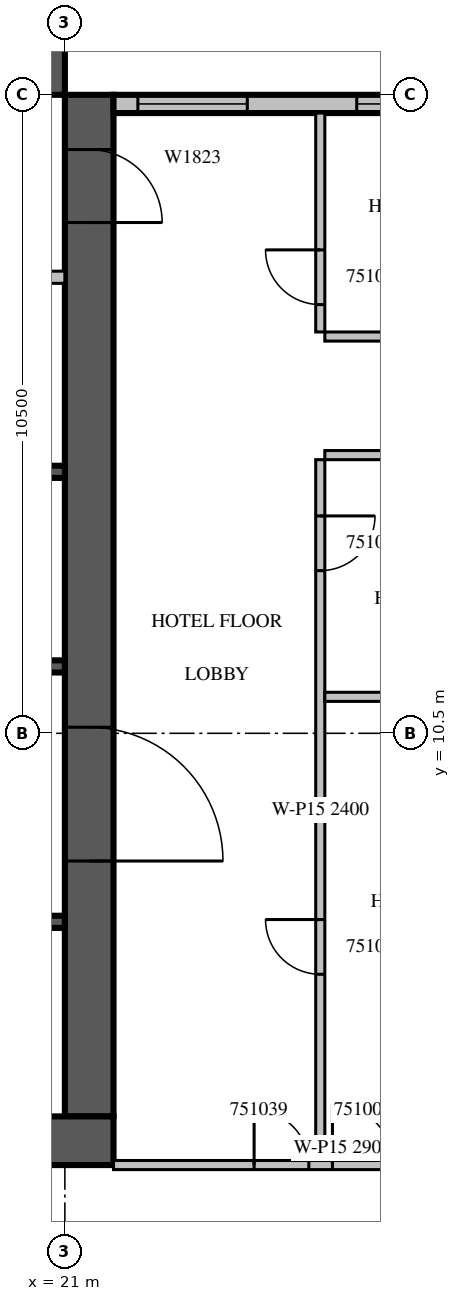
"""IFC4 building model, lengths in metres.
Left out: names, types, materials, properties, quantities, classifications, styles, units other than length and angle.
Written with IfcOpenShell. Run it as: python <this file> out.ifc"""

import sys

from ifc_helpers import new_model, si_unit, direction, frame, frame_2d, origin, place, context, subcontext, project, spatial, rectangle, extrude, source, transform, mapped, element, fill, save


model = new_model("IFC4")
c1 = context("Model", 3, precision=1e-05, world=origin(), true_north=direction((0.0, 1.0)))
c2 = subcontext(c1, "Body", "Model", "MODEL_VIEW")
j1 = project(units=[si_unit("LENGTHUNIT", "METRE"), si_unit("PLANEANGLEUNIT", "RADIAN")], contexts=[c1])
p1 = place(None, origin())
s1 = spatial("IfcSite", under=j1, at=p1, CompositionType="ELEMENT")
p2 = place(p1, origin())
s2 = spatial("IfcBuilding", under=s1, at=p2, CompositionType="ELEMENT")
p3 = place(p2, frame((0.0, 0.0, 227.2)))
s3 = spatial("IfcBuildingStorey", under=s2, at=p3, CompositionType="ELEMENT", Elevation=227.2)
m1 = source(origin(), c2, "Body", "SweptSolid", [
    extrude(rectangle(XDim=16.8, YDim=0.8, at=frame_2d((8.4, 0.0))), origin(), (0.0, 0.0, 1.0), 3.8),
])
p4 = place(p3, frame((21.4, 4.2, 0.0), z_axis=(0.0, 0.0, 1.0), x_axis=(0.0, 1.0, 0.0)))
e1 = element("IfcWall", 1, at=p4, inside=s3, PredefinedType="SHEAR", context=c2, shape_type="MappedRepresentation", body=[
    mapped(m1, transform((0.0, 0.0, 0.0), scale=1.0)),
])
m2 = source(origin(), c2, "Body", "SweptSolid", [
    extrude(rectangle(XDim=2.2, YDim=2.1, at=frame_2d((1.1, 1.05))), frame((0.0, 0.41, 0.0), z_axis=(0.0, -1.0, 0.0), x_axis=(1.0, 0.0, 0.0)), (0.0, 0.0, 1.0), 0.82),
])
p5 = place(p4, frame((4.2, 0.0, 0.0)))
e2 = element("IfcOpeningElement", 2, at=p5, cuts=e1, PredefinedType="OPENING", context=c2, shape_type="MappedRepresentation", body=[
    mapped(m2, transform((0.0, 0.0, 0.0), scale=1.0)),
])
m3 = source(origin(), c2, "Body", "SweptSolid", [
    extrude(rectangle(XDim=1.2, YDim=2.1, at=frame_2d((0.6, 1.05))), frame((0.0, 0.41, 0.0), z_axis=(0.0, -1.0, 0.0), x_axis=(1.0, 0.0, 0.0)), (0.0, 0.0, 1.0), 0.82),
])
p6 = place(p4, frame((14.7, 0.0, 0.0)))
e3 = element("IfcOpeningElement", 3, at=p6, cuts=e1, PredefinedType="OPENING", context=c2, shape_type="MappedRepresentation", body=[
    mapped(m3, transform((0.0, 0.0, 0.0), scale=1.0)),
])
m4 = source(origin(), c2, "Body", "SweptSolid", [
    extrude(rectangle(XDim=17.6, YDim=0.8, at=frame_2d((8.8, 0.0))), origin(), (0.0, 0.0, 1.0), 3.8),
])
p7 = place(p3, frame((4.2, 3.8, 0.0), z_axis=(0.0, 0.0, 1.0), x_axis=(1.0, 0.0, 0.0)))
e4 = element("IfcWall", 4, at=p7, inside=s3, PredefinedType="SHEAR", context=c2, shape_type="MappedRepresentation", body=[
    mapped(m4, transform((0.0, 0.0, 0.0), scale=1.0)),
])
m5 = source(origin(), c2, "Body", "SweptSolid", [
    extrude(rectangle(XDim=0.9, YDim=2.1, at=frame_2d((0.45, 1.05))), frame((0.0, 0.41, 0.0), z_axis=(0.0, -1.0, 0.0), x_axis=(1.0, 0.0, 0.0)), (0.0, 0.0, 1.0), 0.82),
])
p8 = place(p7, frame((11.55, 0.0, 0.0)))
e5 = element("IfcOpeningElement", 5, at=p8, cuts=e4, PredefinedType="OPENING", context=c2, shape_type="MappedRepresentation", body=[
    mapped(m5, transform((0.0, 0.0, 0.0), scale=1.0)),
])
p9 = place(p3, frame((4.2, 21.4, 0.0), z_axis=(0.0, 0.0, 1.0), x_axis=(1.0, 0.0, 0.0)))
e6 = element("IfcWall", 6, at=p9, inside=s3, PredefinedType="SHEAR", context=c2, shape_type="MappedRepresentation", body=[
    mapped(m1, transform((0.0, 0.0, 0.0), scale=1.0)),
])
p10 = place(p9, frame((6.2, 0.0, 0.0)))
e7 = element("IfcOpeningElement", 7, at=p10, cuts=e6, PredefinedType="OPENING", context=c2, shape_type="MappedRepresentation", body=[
    mapped(m3, transform((0.0, 0.0, 0.0), scale=1.0)),
])
p11 = place(p3, frame((29.0, 20.85, 0.0), z_axis=(0.0, 0.0, 1.0), x_axis=(-1.0, 0.0, 0.0)))
e8 = element("IfcWall", 8, at=p11, inside=s3, PredefinedType="STANDARD", context=c2, shape_type="SweptSolid", body=[
    extrude(rectangle(XDim=7.2, YDim=0.3, at=frame_2d((3.6, 0.0))), origin(), (0.0, 0.0, 1.0), 3.4),
])
m6 = source(origin(), c2, "Body", "SweptSolid", [
    extrude(rectangle(XDim=3.0, YDim=2.3, at=frame_2d((1.5, 1.15))), frame((0.0, 0.16, 0.0), z_axis=(0.0, -1.0, 0.0), x_axis=(1.0, 0.0, 0.0)), (0.0, 0.0, 1.0), 0.32),
])
p12 = place(p11, frame((0.2, 0.0, 0.6)))
e9 = element("IfcOpeningElement", 9, at=p12, cuts=e8, PredefinedType="OPENING", context=c2, shape_type="MappedRepresentation", body=[
    mapped(m6, transform((0.0, 0.0, 0.0), scale=1.0)),
])
m7 = source(origin(), c2, "Body", "SweptSolid", [
    extrude(rectangle(XDim=1.8, YDim=2.3, at=frame_2d((0.9, 1.15))), frame((0.0, 0.16, 0.0), z_axis=(0.0, -1.0, 0.0), x_axis=(1.0, 0.0, 0.0)), (0.0, 0.0, 1.0), 0.32),
])
p13 = place(p11, frame((5.0, 0.0, 0.6)))
e10 = element("IfcOpeningElement", 10, at=p13, cuts=e8, PredefinedType="OPENING", context=c2, shape_type="MappedRepresentation", body=[
    mapped(m7, transform((0.0, 0.0, 0.0), scale=1.0)),
])
m8 = source(origin(), c2, "Body", "SweptSolid", [
    extrude(rectangle(XDim=2.4, YDim=0.2, at=frame_2d((1.2, 0.0))), origin(), (0.0, 0.0, 1.0), 3.8),
])
p14 = place(p3, frame((18.6, 7.4, 0.0), z_axis=(0.0, 0.0, 1.0), x_axis=(1.0, 0.0, 0.0)))
e11 = element("IfcWall", 11, at=p14, inside=s3, PredefinedType="SOLIDWALL", context=c2, shape_type="MappedRepresentation", body=[
    mapped(m8, transform((0.0, 0.0, 0.0), scale=1.0)),
])
m9 = source(origin(), c2, "Body", "SweptSolid", [
    extrude(rectangle(XDim=9.6, YDim=0.2, at=frame_2d((4.8, 0.0))), origin(), (0.0, 0.0, 1.0), 3.8),
])
p15 = place(p3, frame((11.4, 11.6, 0.0), z_axis=(0.0, 0.0, 1.0), x_axis=(1.0, 0.0, 0.0)))
e12 = element("IfcWall", 12, at=p15, inside=s3, PredefinedType="SOLIDWALL", context=c2, shape_type="MappedRepresentation", body=[
    mapped(m9, transform((0.0, 0.0, 0.0), scale=1.0)),
])
p16 = place(p3, frame((11.4, 14.8, 0.0), z_axis=(0.0, 0.0, 1.0), x_axis=(1.0, 0.0, 0.0)))
e13 = element("IfcWall", 13, at=p16, inside=s3, PredefinedType="SOLIDWALL", context=c2, shape_type="MappedRepresentation", body=[
    mapped(m9, transform((0.0, 0.0, 0.0), scale=1.0)),
])
m10 = source(origin(), c2, "Body", "SweptSolid", [
    extrude(rectangle(XDim=1.1, YDim=2.1, at=frame_2d((0.55, 1.05))), frame((0.0, 0.11, 0.0), z_axis=(0.0, -1.0, 0.0), x_axis=(1.0, 0.0, 0.0)), (0.0, 0.0, 1.0), 0.22),
])
p17 = place(p16, frame((3.05, 0.0, 0.0)))
e14 = element("IfcOpeningElement", 14, at=p17, cuts=e13, PredefinedType="OPENING", context=c2, shape_type="MappedRepresentation", body=[
    mapped(m10, transform((0.0, 0.0, 0.0), scale=1.0)),
])
p18 = place(p16, frame((5.45, 0.0, 0.0)))
e15 = element("IfcOpeningElement", 15, at=p18, cuts=e13, PredefinedType="OPENING", context=c2, shape_type="MappedRepresentation", body=[
    mapped(m10, transform((0.0, 0.0, 0.0), scale=1.0)),
])
p19 = place(p16, frame((7.85, 0.0, 0.0)))
e16 = element("IfcOpeningElement", 16, at=p19, cuts=e13, PredefinedType="OPENING", context=c2, shape_type="MappedRepresentation", body=[
    mapped(m10, transform((0.0, 0.0, 0.0), scale=1.0)),
])
m11 = source(origin(), c2, "Body", "SweptSolid", [
    extrude(rectangle(XDim=11.45, YDim=0.2, at=frame_2d((5.725, 0.0))), origin(), (0.0, 0.0, 1.0), 3.4),
])
p20 = place(p3, frame((9.55, 18.0, 0.0), z_axis=(0.0, 0.0, 1.0), x_axis=(1.0, 0.0, 0.0)))
e17 = element("IfcWall", 17, at=p20, inside=s3, PredefinedType="PARTITIONING", context=c2, shape_type="MappedRepresentation", body=[
    mapped(m11, transform((0.0, 0.0, 0.0), scale=1.0)),
])
m12 = source(origin(), c2, "Body", "SweptSolid", [
    extrude(rectangle(XDim=0.9, YDim=2.1, at=frame_2d((0.45, 1.05))), frame((0.0, 0.11, 0.0), z_axis=(0.0, -1.0, 0.0), x_axis=(1.0, 0.0, 0.0)), (0.0, 0.0, 1.0), 0.22),
])
p21 = place(p20, frame((1.075, 0.0, 0.0)))
e18 = element("IfcOpeningElement", 18, at=p21, cuts=e17, PredefinedType="OPENING", context=c2, shape_type="MappedRepresentation", body=[
    mapped(m12, transform((0.0, 0.0, 0.0), scale=1.0)),
])
p22 = place(p20, frame((3.125, 0.0, 0.0)))
e19 = element("IfcOpeningElement", 19, at=p22, cuts=e17, PredefinedType="OPENING", context=c2, shape_type="MappedRepresentation", body=[
    mapped(m12, transform((0.0, 0.0, 0.0), scale=1.0)),
])
p23 = place(p20, frame((7.35, 0.0, 0.0)))
e20 = element("IfcOpeningElement", 20, at=p23, cuts=e17, PredefinedType="OPENING", context=c2, shape_type="MappedRepresentation", body=[
    mapped(m10, transform((0.0, 0.0, 0.0), scale=1.0)),
])
m13 = source(origin(), c2, "Body", "SweptSolid", [
    extrude(rectangle(XDim=11.525, YDim=0.15, at=frame_2d((5.763, 0.0))), origin(), (0.0, 0.0, 1.0), 2.4),
])
p24 = place(p3, frame((25.2, 15.0, 0.0), z_axis=(0.0, 0.0, 1.0), x_axis=(0.0, -1.0, 0.0)))
e21 = element("IfcWall", 21, at=p24, inside=s3, PredefinedType="PARTITIONING", context=c2, shape_type="MappedRepresentation", body=[
    mapped(m13, transform((0.0, 0.0, 0.0), scale=1.0)),
])
m14 = source(origin(), c2, "Body", "SweptSolid", [
    extrude(rectangle(XDim=0.9, YDim=2.1, at=frame_2d((0.45, 1.05))), frame((0.0, 0.085, 0.0), z_axis=(0.0, -1.0, 0.0), x_axis=(1.0, 0.0, 0.0)), (0.0, 0.0, 1.0), 0.17),
])
p25 = place(p24, frame((7.562, 0.0, 0.0)))
e22 = element("IfcOpeningElement", 22, at=p25, cuts=e21, PredefinedType="OPENING", context=c2, shape_type="MappedRepresentation", body=[
    mapped(m14, transform((0.0, 0.0, 0.0), scale=1.0)),
])
p26 = place(p24, frame((0.925, 0.0, 0.0)))
e23 = element("IfcOpeningElement", 23, at=p26, cuts=e21, PredefinedType="OPENING", context=c2, shape_type="MappedRepresentation", body=[
    mapped(m14, transform((0.0, 0.0, 0.0), scale=1.0)),
])
m15 = source(origin(), c2, "Body", "SweptSolid", [
    extrude(rectangle(XDim=3.6, YDim=0.15, at=frame_2d((1.8, 0.0))), origin(), (0.0, 0.0, 1.0), 3.4),
])
p27 = place(p3, frame((25.2, 20.7, 0.0), z_axis=(0.0, 0.0, 1.0), x_axis=(0.0, -1.0, 0.0)))
e24 = element("IfcWall", 24, at=p27, inside=s3, PredefinedType="PARTITIONING", context=c2, shape_type="MappedRepresentation", body=[
    mapped(m15, transform((0.0, 0.0, 0.0), scale=1.0)),
])
p28 = place(p27, frame((2.25, 0.0, 0.0)))
e25 = element("IfcOpeningElement", 25, at=p28, cuts=e24, PredefinedType="OPENING", context=c2, shape_type="MappedRepresentation", body=[
    mapped(m14, transform((0.0, 0.0, 0.0), scale=1.0)),
])
m16 = source(origin(), c2, "Body", "SweptSolid", [
    extrude(rectangle(XDim=4.05, YDim=0.15, at=frame_2d((2.025, 0.0))), origin(), (0.0, 0.0, 1.0), 3.4),
])
for number, where, z_axis, x_axis in (
    (26, (29.325, 11.1, 0.0), (0.0, 0.0, 1.0), (-1.0, 0.0, 0.0)),
    (27, (29.325, 15.075, 0.0), (0.0, 0.0, 1.0), (-1.0, 0.0, 0.0)),
    (28, (25.275, 17.025, 0.0), (0.0, 0.0, 1.0), (1.0, 0.0, 0.0)),
):
    element("IfcWall", number, at=place(p3, frame(where, z_axis=z_axis, x_axis=x_axis)), inside=s3, PredefinedType="PARTITIONING", context=c2, shape_type="MappedRepresentation", body=[
        mapped(m16, transform((0.0, 0.0, 0.0), scale=1.0)),
    ])
m17 = source(origin(), c2, "Body", "SweptSolid", [
    extrude(rectangle(XDim=7.525, YDim=0.15, at=frame_2d((3.763, 0.0))), origin(), (0.0, 0.0, 1.0), 2.9),
])
p29 = place(p3, frame((21.8, 3.4, 0.0), z_axis=(0.0, 0.0, 1.0), x_axis=(1.0, 0.0, 0.0)))
e29 = element("IfcWall", 29, at=p29, inside=s3, PredefinedType="PARTITIONING", context=c2, shape_type="MappedRepresentation", body=[
    mapped(m17, transform((0.0, 0.0, 0.0), scale=1.0)),
])
m18 = source(origin(), c2, "Body", "SweptSolid", [
    extrude(rectangle(XDim=1.0, YDim=2.1, at=frame_2d((0.5, 1.05))), frame((0.0, 0.085, 0.0), z_axis=(0.0, -1.0, 0.0), x_axis=(1.0, 0.0, 0.0)), (0.0, 0.0, 1.0), 0.17),
])
p30 = place(p29, frame((3.6, 0.0, 0.0)))
e30 = element("IfcOpeningElement", 30, at=p30, cuts=e29, PredefinedType="OPENING", context=c2, shape_type="MappedRepresentation", body=[
    mapped(m18, transform((0.0, 0.0, 0.0), scale=1.0)),
])
p31 = place(p29, frame((2.312, 0.0, 0.0)))
e31 = element("IfcOpeningElement", 31, at=p31, cuts=e29, PredefinedType="OPENING", context=c2, shape_type="MappedRepresentation", body=[
    mapped(m14, transform((0.0, 0.0, 0.0), scale=1.0)),
])
m19 = source(origin(), c2, "Body", "SweptSolid", [
    extrude(rectangle(XDim=3.0, YDim=2.3, at=frame_2d((1.5, 1.15))), frame((0.0, 0.03, 0.0), z_axis=(0.0, -1.0, 0.0), x_axis=(1.0, 0.0, 0.0)), (0.0, 0.0, 1.0), 0.06),
])
p32 = place(p12, origin())
e32 = element("IfcWindow", 32, at=p32, inside=s3, PartitioningType="SINGLE_PANEL", PredefinedType="WINDOW", context=c2, shape_type="MappedRepresentation", body=[
    mapped(m19, transform((0.0, 0.0, 0.0), scale=1.0)),
])
fill(e9, e32)
m20 = source(origin(), c2, "Body", "SweptSolid", [
    extrude(rectangle(XDim=1.8, YDim=2.3, at=frame_2d((0.9, 1.15))), frame((0.0, 0.03, 0.0), z_axis=(0.0, -1.0, 0.0), x_axis=(1.0, 0.0, 0.0)), (0.0, 0.0, 1.0), 0.06),
])
p33 = place(p13, origin())
e33 = element("IfcWindow", 33, at=p33, inside=s3, PartitioningType="SINGLE_PANEL", PredefinedType="WINDOW", context=c2, shape_type="MappedRepresentation", body=[
    mapped(m20, transform((0.0, 0.0, 0.0), scale=1.0)),
])
fill(e10, e33)
m21 = source(origin(), c2, "Body", "SweptSolid", [
    extrude(rectangle(XDim=2.2, YDim=2.1, at=frame_2d((1.1, 1.05))), frame((0.0, 0.025, 0.0), z_axis=(0.0, -1.0, 0.0), x_axis=(1.0, 0.0, 0.0)), (0.0, 0.0, 1.0), 0.05),
])
p34 = place(p5, origin())
e34 = element("IfcDoor", 34, at=p34, inside=s3, OperationType="DOUBLE_DOOR_SINGLE_SWING", PredefinedType="DOOR", context=c2, shape_type="MappedRepresentation", body=[
    mapped(m21, transform((0.0, 0.0, 0.0), scale=1.0)),
])
fill(e2, e34)
m22 = source(origin(), c2, "Body", "SweptSolid", [
    extrude(rectangle(XDim=1.2, YDim=2.1, at=frame_2d((0.6, 1.05))), frame((0.0, 0.025, 0.0), z_axis=(0.0, -1.0, 0.0), x_axis=(1.0, 0.0, 0.0)), (0.0, 0.0, 1.0), 0.05),
])
p35 = place(p6, origin())
e35 = element("IfcDoor", 35, at=p35, inside=s3, OperationType="SINGLE_SWING_RIGHT", PredefinedType="DOOR", context=c2, shape_type="MappedRepresentation", body=[
    mapped(m22, transform((0.0, 0.0, 0.0), scale=1.0)),
])
fill(e3, e35)
m23 = source(origin(), c2, "Body", "SweptSolid", [
    extrude(rectangle(XDim=0.9, YDim=2.1, at=frame_2d((0.45, 1.05))), frame((0.0, 0.025, 0.0), z_axis=(0.0, -1.0, 0.0), x_axis=(1.0, 0.0, 0.0)), (0.0, 0.0, 1.0), 0.05),
])
p36 = place(p25, origin())
e36 = element("IfcDoor", 36, at=p36, inside=s3, OperationType="SINGLE_SWING_RIGHT", PredefinedType="DOOR", context=c2, shape_type="MappedRepresentation", body=[
    mapped(m23, transform((0.0, 0.0, 0.0), scale=1.0)),
])
fill(e22, e36)
p37 = place(p26, origin())
e37 = element("IfcDoor", 37, at=p37, inside=s3, OperationType="SINGLE_SWING_LEFT", PredefinedType="DOOR", context=c2, shape_type="MappedRepresentation", body=[
    mapped(m23, transform((0.0, 0.0, 0.0), scale=1.0)),
])
fill(e23, e37)
p38 = place(p28, origin())
e38 = element("IfcDoor", 38, at=p38, inside=s3, OperationType="SINGLE_SWING_RIGHT", PredefinedType="DOOR", context=c2, shape_type="MappedRepresentation", body=[
    mapped(m23, transform((0.0, 0.0, 0.0), scale=1.0)),
])
fill(e25, e38)
m24 = source(origin(), c2, "Body", "SweptSolid", [
    extrude(rectangle(XDim=1.0, YDim=2.1, at=frame_2d((0.5, 1.05))), frame((0.0, 0.025, 0.0), z_axis=(0.0, -1.0, 0.0), x_axis=(1.0, 0.0, 0.0)), (0.0, 0.0, 1.0), 0.05),
])
p39 = place(p30, origin())
e39 = element("IfcDoor", 39, at=p39, inside=s3, OperationType="SINGLE_SWING_LEFT", PredefinedType="DOOR", context=c2, shape_type="MappedRepresentation", body=[
    mapped(m24, transform((0.0, 0.0, 0.0), scale=1.0)),
])
fill(e30, e39)
p40 = place(p31, origin())
e40 = element("IfcDoor", 40, at=p40, inside=s3, OperationType="SINGLE_SWING_LEFT", PredefinedType="DOOR", context=c2, shape_type="MappedRepresentation", body=[
    mapped(m23, transform((0.0, 0.0, 0.0), scale=1.0)),
])
fill(e31, e40)
save(model, sys.argv[1])
